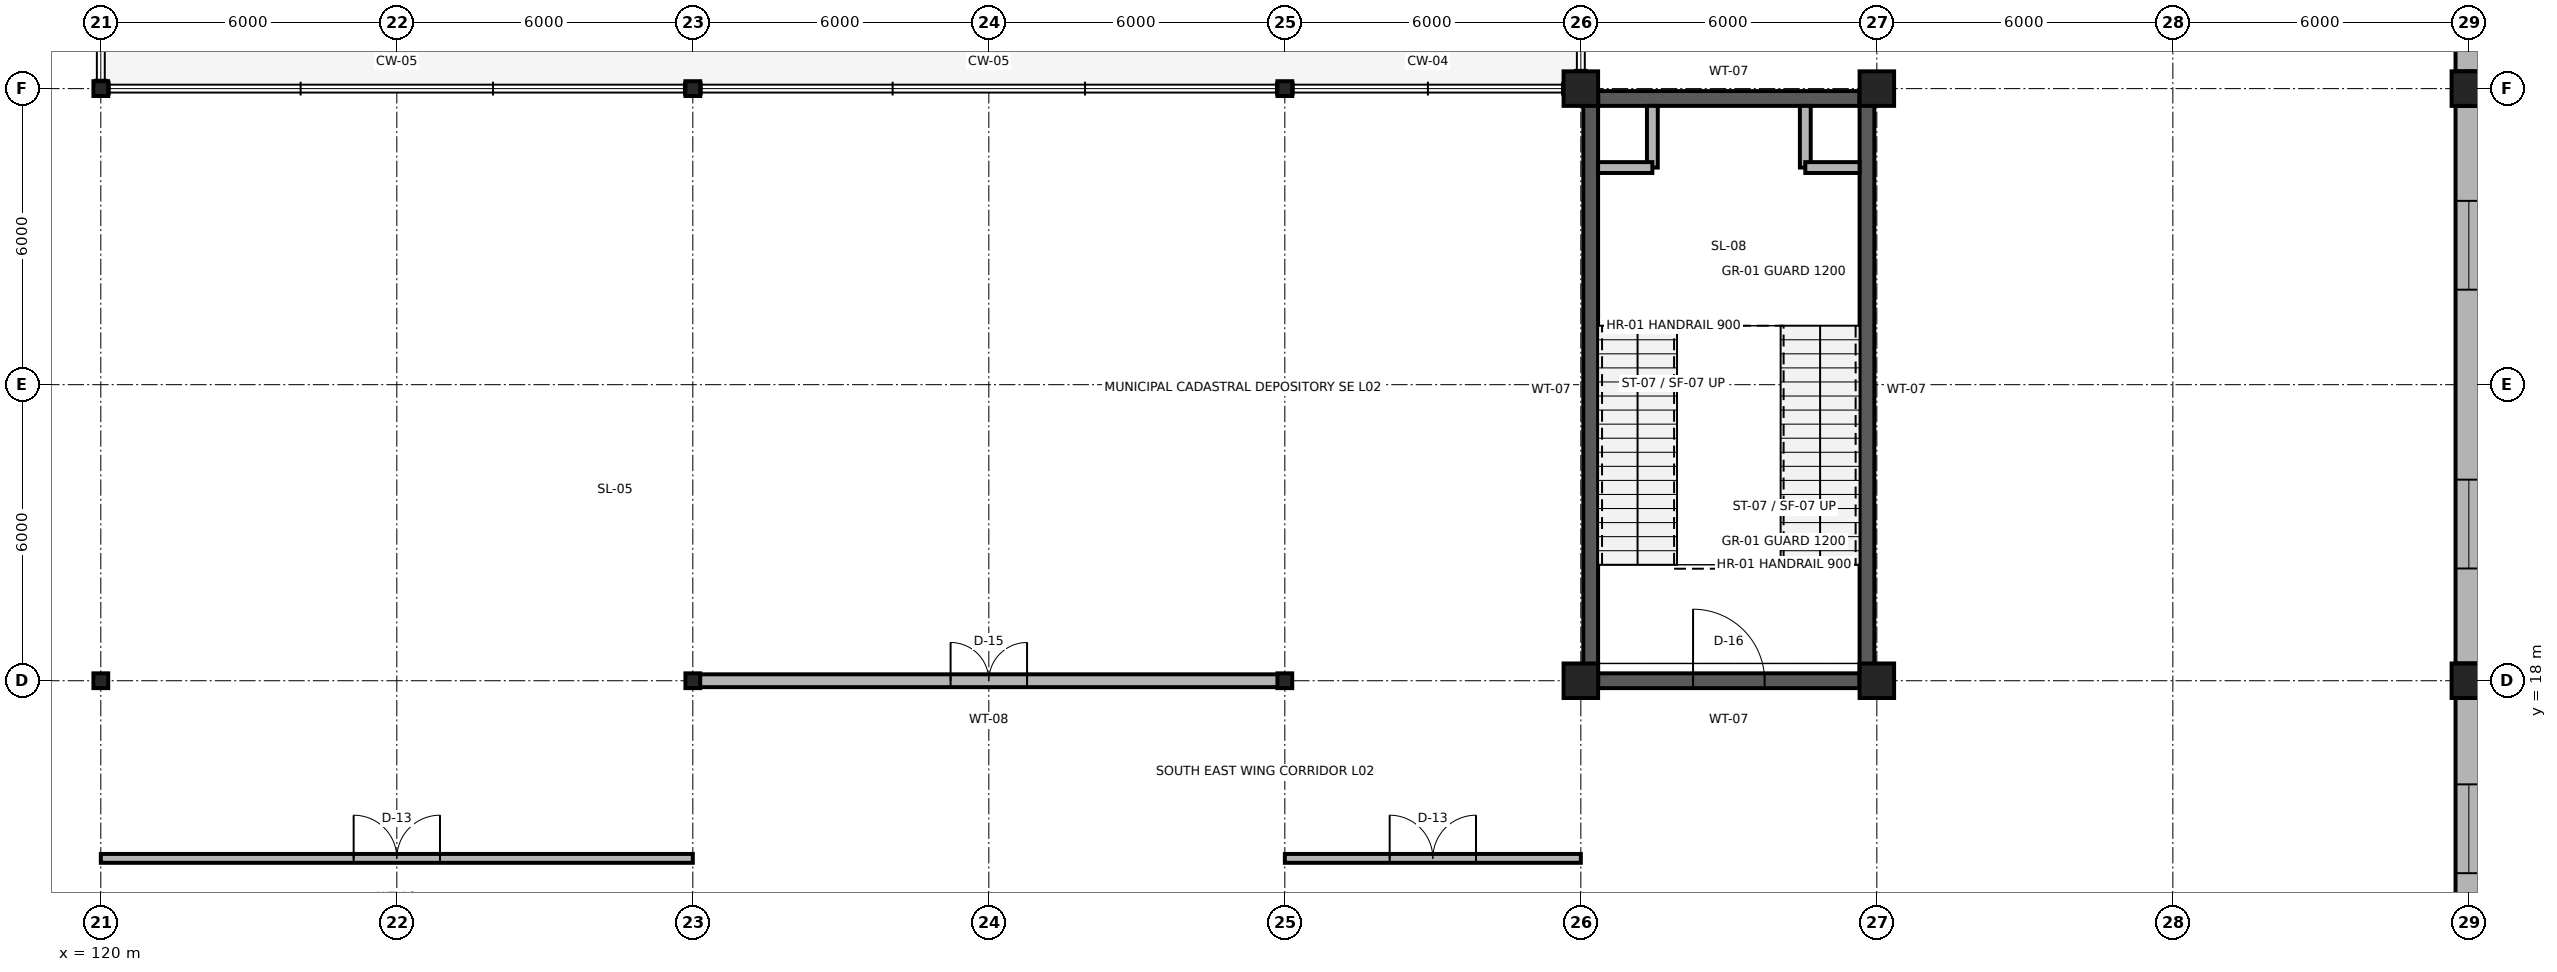
"""IFC4 building model, lengths in metres.
Left out: names, types, materials, properties, quantities, classifications, styles, units other than length and angle.
Written with IfcOpenShell. Run it as: python <this file> out.ifc"""

import sys

from ifc_helpers import new_model, si_unit, direction, frame, frame_2d, origin, origin_2d, place, context, subcontext, project, spatial, rectangle, i_section, extrude, element, fill, save


model = new_model("IFC4")
c1 = context("Model", 3, precision=1e-05, world=origin(), true_north=direction((0.0, 1.0)))
c2 = subcontext(c1, "Body", "Model", "MODEL_VIEW")
j1 = project(units=[si_unit("LENGTHUNIT", "METRE"), si_unit("PLANEANGLEUNIT", "RADIAN")], contexts=[c1])
p1 = place(None, origin())
s1 = spatial("IfcSite", under=j1, at=p1, CompositionType="ELEMENT")
p2 = place(p1, origin())
s2 = spatial("IfcBuilding", under=s1, at=p2, CompositionType="ELEMENT")
p3 = place(p2, frame((0.0, 0.0, 6.0)))
s3 = spatial("IfcBuildingStorey", under=s2, at=p3, CompositionType="ELEMENT", Elevation=6.0)
for number, where, z_axis, x_axis in (
    (1, (120.0, 18.0, 0.0), (0.0, 0.0, 1.0), (1.0, 0.0, 0.0)),
    (2, (132.0, 18.0, 0.0), (0.0, 0.0, 1.0), (1.0, 0.0, 0.0)),
    (3, (144.0, 18.0, 0.0), (0.0, 0.0, 1.0), (1.0, 0.0, 0.0)),
):
    element("IfcColumn", number, at=place(p3, frame(where, z_axis=z_axis, x_axis=x_axis)), inside=s3, PredefinedType="COLUMN", context=c2, shape_type="SweptSolid", body=[
        extrude(i_section(OverallWidth=0.3, OverallDepth=0.3, WebThickness=0.01, FlangeThickness=0.015, FilletRadius=0.018, at=origin_2d()), origin(), (0.0, 0.0, 1.0), 6.0),
    ])
for number, where, z_axis, x_axis in (
    (4, (150.0, 18.0, 0.0), (0.0, 0.0, 1.0), (1.0, 0.0, 0.0)),
    (5, (156.0, 18.0, 0.0), (0.0, 0.0, 1.0), (1.0, 0.0, 0.0)),
    (6, (168.0, 18.0, 0.0), (0.0, 0.0, 1.0), (1.0, 0.0, 0.0)),
):
    element("IfcColumn", number, at=place(p3, frame(where, z_axis=z_axis, x_axis=x_axis)), inside=s3, PredefinedType="COLUMN", context=c2, shape_type="SweptSolid", body=[
        extrude(rectangle(XDim=0.7, YDim=0.7, at=origin_2d()), origin(), (0.0, 0.0, 1.0), 6.0),
    ])
for number, where, z_axis, x_axis in (
    (7, (120.0, 30.0, 0.0), (0.0, 0.0, 1.0), (1.0, 0.0, 0.0)),
    (8, (132.0, 30.0, 0.0), (0.0, 0.0, 1.0), (1.0, 0.0, 0.0)),
    (9, (144.0, 30.0, 0.0), (0.0, 0.0, 1.0), (1.0, 0.0, 0.0)),
):
    element("IfcColumn", number, at=place(p3, frame(where, z_axis=z_axis, x_axis=x_axis)), inside=s3, PredefinedType="COLUMN", context=c2, shape_type="SweptSolid", body=[
        extrude(i_section(OverallWidth=0.3, OverallDepth=0.3, WebThickness=0.01, FlangeThickness=0.015, FilletRadius=0.018, at=origin_2d()), origin(), (0.0, 0.0, 1.0), 6.0),
    ])
for number, where, z_axis, x_axis in (
    (10, (150.0, 30.0, 0.0), (0.0, 0.0, 1.0), (1.0, 0.0, 0.0)),
    (11, (156.0, 30.0, 0.0), (0.0, 0.0, 1.0), (1.0, 0.0, 0.0)),
    (12, (168.0, 30.0, 0.0), (0.0, 0.0, 1.0), (1.0, 0.0, 0.0)),
):
    element("IfcColumn", number, at=place(p3, frame(where, z_axis=z_axis, x_axis=x_axis)), inside=s3, PredefinedType="COLUMN", context=c2, shape_type="SweptSolid", body=[
        extrude(rectangle(XDim=0.7, YDim=0.7, at=origin_2d()), origin(), (0.0, 0.0, 1.0), 6.0),
    ])
p4 = place(p3, frame((168.0, 12.35, 0.0), z_axis=(0.0, 0.0, 1.0), x_axis=(0.0, 1.0, 0.0)))
e13 = element("IfcWall", 13, at=p4, inside=s3, PredefinedType="SOLIDWALL", context=c2, shape_type="SweptSolid", body=[
    extrude(rectangle(XDim=5.3, YDim=0.54, at=frame_2d((2.65, 0.0))), origin(), (0.0, 0.0, 1.0), 5.31),
])
p5 = place(p4, frame((1.75, 0.0, 0.85)))
e14 = element("IfcOpeningElement", 14, at=p5, cuts=e13, PredefinedType="OPENING", context=c2, shape_type="SweptSolid", body=[
    extrude(rectangle(XDim=1.8, YDim=3.3, at=frame_2d((0.9, 1.65))), frame((0.0, 0.285, 0.0), z_axis=(0.0, -1.0, 0.0), x_axis=(1.0, 0.0, 0.0)), (0.0, 0.0, 1.0), 0.57),
])
p6 = place(p3, frame((168.0, 18.35, 0.0), z_axis=(0.0, 0.0, 1.0), x_axis=(0.0, 1.0, 0.0)))
e15 = element("IfcWall", 15, at=p6, inside=s3, PredefinedType="SOLIDWALL", context=c2, shape_type="SweptSolid", body=[
    extrude(rectangle(XDim=11.3, YDim=0.54, at=frame_2d((5.65, 0.0))), origin(), (0.0, 0.0, 1.0), 5.31),
])
p7 = place(p6, frame((1.925, 0.0, 0.85)))
e16 = element("IfcOpeningElement", 16, at=p7, cuts=e15, PredefinedType="OPENING", context=c2, shape_type="SweptSolid", body=[
    extrude(rectangle(XDim=1.8, YDim=3.3, at=frame_2d((0.9, 1.65))), frame((0.0, 0.285, 0.0), z_axis=(0.0, -1.0, 0.0), x_axis=(1.0, 0.0, 0.0)), (0.0, 0.0, 1.0), 0.57),
])
p8 = place(p6, frame((7.575, 0.0, 0.85)))
e17 = element("IfcOpeningElement", 17, at=p8, cuts=e15, PredefinedType="OPENING", context=c2, shape_type="SweptSolid", body=[
    extrude(rectangle(XDim=1.8, YDim=3.3, at=frame_2d((0.9, 1.65))), frame((0.0, 0.285, 0.0), z_axis=(0.0, -1.0, 0.0), x_axis=(1.0, 0.0, 0.0)), (0.0, 0.0, 1.0), 0.57),
])
p9 = place(p3, frame((168.0, 30.35, 0.0), z_axis=(0.0, 0.0, 1.0), x_axis=(0.0, 1.0, 0.0)))
e18 = element("IfcWall", 18, at=p9, inside=s3, PredefinedType="SOLIDWALL", context=c2, shape_type="SweptSolid", body=[
    extrude(rectangle(XDim=5.3, YDim=0.54, at=frame_2d((2.65, 0.0))), origin(), (0.0, 0.0, 1.0), 5.31),
])
p10 = place(p9, frame((1.75, 0.0, 0.85)))
e19 = element("IfcOpeningElement", 19, at=p10, cuts=e18, PredefinedType="OPENING", context=c2, shape_type="SweptSolid", body=[
    extrude(rectangle(XDim=1.8, YDim=3.3, at=frame_2d((0.9, 1.65))), frame((0.0, 0.285, 0.0), z_axis=(0.0, -1.0, 0.0), x_axis=(1.0, 0.0, 0.0)), (0.0, 0.0, 1.0), 0.57),
])
p11 = place(p3, frame((150.35, 18.0, 0.0), z_axis=(0.0, 0.0, 1.0), x_axis=(1.0, 0.0, 0.0)))
e20 = element("IfcWall", 20, at=p11, inside=s3, PredefinedType="SHEAR", context=c2, shape_type="SweptSolid", body=[
    extrude(rectangle(XDim=5.3, YDim=0.3, at=frame_2d((2.65, 0.0))), origin(), (0.0, 0.0, 1.0), 5.76),
])
p12 = place(p11, frame((1.925, 0.0, 0.0)))
e21 = element("IfcOpeningElement", 21, at=p12, cuts=e20, PredefinedType="OPENING", context=c2, shape_type="SweptSolid", body=[
    extrude(rectangle(XDim=1.45, YDim=2.25, at=frame_2d((0.725, 1.125))), frame((0.0, 0.165, 0.0), z_axis=(0.0, -1.0, 0.0), x_axis=(1.0, 0.0, 0.0)), (0.0, 0.0, 1.0), 0.33),
])
p13 = place(p3, frame((150.35, 29.8, 0.0), z_axis=(0.0, 0.0, 1.0), x_axis=(1.0, 0.0, 0.0)))
e22 = element("IfcWall", 22, at=p13, inside=s3, PredefinedType="SHEAR", context=c2, shape_type="SweptSolid", body=[
    extrude(rectangle(XDim=5.3, YDim=0.3, at=frame_2d((2.65, 0.0))), origin(), (0.0, 0.0, 1.0), 5.76),
])
for number, where, z_axis, x_axis in (
    (23, (150.2, 18.0, 0.0), (0.0, 0.0, 1.0), (0.0, 1.0, 0.0)),
    (24, (155.8, 18.0, 0.0), (0.0, 0.0, 1.0), (0.0, 1.0, 0.0)),
):
    element("IfcWall", number, at=place(p3, frame(where, z_axis=z_axis, x_axis=x_axis)), inside=s3, PredefinedType="SHEAR", context=c2, shape_type="SweptSolid", body=[
        extrude(rectangle(XDim=11.8, YDim=0.3, at=frame_2d((5.9, 0.0))), origin(), (0.0, 0.0, 1.0), 5.76),
    ])
p14 = place(p3, frame((151.45, 28.4, 0.0), z_axis=(0.0, 0.0, 1.0), x_axis=(0.0, 1.0, 0.0)))
e25 = element("IfcWall", 25, at=p14, inside=s3, PredefinedType="PARTITIONING", context=c2, shape_type="SweptSolid", body=[
    extrude(rectangle(XDim=1.25, YDim=0.22, at=frame_2d((0.625, 0.0))), origin(), (0.0, 0.0, 1.0), 5.76),
])
p15 = place(p3, frame((150.35, 28.4, 0.0), z_axis=(0.0, 0.0, 1.0), x_axis=(1.0, 0.0, 0.0)))
e26 = element("IfcWall", 26, at=p15, inside=s3, PredefinedType="PARTITIONING", context=c2, shape_type="SweptSolid", body=[
    extrude(rectangle(XDim=1.1, YDim=0.22, at=frame_2d((0.55, 0.0))), origin(), (0.0, 0.0, 1.0), 5.76),
])
p16 = place(p3, frame((154.55, 28.4, 0.0), z_axis=(0.0, 0.0, 1.0), x_axis=(0.0, 1.0, 0.0)))
e27 = element("IfcWall", 27, at=p16, inside=s3, PredefinedType="PARTITIONING", context=c2, shape_type="SweptSolid", body=[
    extrude(rectangle(XDim=1.25, YDim=0.22, at=frame_2d((0.625, 0.0))), origin(), (0.0, 0.0, 1.0), 5.76),
])
p17 = place(p3, frame((154.55, 28.4, 0.0), z_axis=(0.0, 0.0, 1.0), x_axis=(1.0, 0.0, 0.0)))
e28 = element("IfcWall", 28, at=p17, inside=s3, PredefinedType="PARTITIONING", context=c2, shape_type="SweptSolid", body=[
    extrude(rectangle(XDim=1.1, YDim=0.22, at=frame_2d((0.55, 0.0))), origin(), (0.0, 0.0, 1.0), 5.76),
])
p18 = place(p3, frame((120.0, 14.4, 0.0), z_axis=(0.0, 0.0, 1.0), x_axis=(1.0, 0.0, 0.0)))
e29 = element("IfcWall", 29, at=p18, inside=s3, PredefinedType="PARTITIONING", context=c2, shape_type="SweptSolid", body=[
    extrude(rectangle(XDim=12.0, YDim=0.18, at=frame_2d((6.0, 0.0))), origin(), (0.0, 0.0, 1.0), 5.76),
])
p19 = place(p18, frame((5.125, 0.0, 0.0)))
e30 = element("IfcOpeningElement", 30, at=p19, cuts=e29, PredefinedType="OPENING", context=c2, shape_type="SweptSolid", body=[
    extrude(rectangle(XDim=1.75, YDim=2.55, at=frame_2d((0.875, 1.275))), frame((0.0, 0.105, 0.0), z_axis=(0.0, -1.0, 0.0), x_axis=(1.0, 0.0, 0.0)), (0.0, 0.0, 1.0), 0.21),
])
p20 = place(p3, frame((144.0, 14.4, 0.0), z_axis=(0.0, 0.0, 1.0), x_axis=(1.0, 0.0, 0.0)))
e31 = element("IfcWall", 31, at=p20, inside=s3, PredefinedType="PARTITIONING", context=c2, shape_type="SweptSolid", body=[
    extrude(rectangle(XDim=6.0, YDim=0.18, at=frame_2d((3.0, 0.0))), origin(), (0.0, 0.0, 1.0), 5.76),
])
p21 = place(p20, frame((2.125, 0.0, 0.0)))
e32 = element("IfcOpeningElement", 32, at=p21, cuts=e31, PredefinedType="OPENING", context=c2, shape_type="SweptSolid", body=[
    extrude(rectangle(XDim=1.75, YDim=2.55, at=frame_2d((0.875, 1.275))), frame((0.0, 0.105, 0.0), z_axis=(0.0, -1.0, 0.0), x_axis=(1.0, 0.0, 0.0)), (0.0, 0.0, 1.0), 0.21),
])
p22 = place(p3, frame((132.0, 18.0, 0.0), z_axis=(0.0, 0.0, 1.0), x_axis=(1.0, 0.0, 0.0)))
e33 = element("IfcWall", 33, at=p22, inside=s3, PredefinedType="PARTITIONING", context=c2, shape_type="SweptSolid", body=[
    extrude(rectangle(XDim=12.0, YDim=0.26, at=frame_2d((6.0, 0.0))), origin(), (0.0, 0.0, 1.0), 5.178),
])
p23 = place(p22, frame((5.225, 0.0, 0.0)))
e34 = element("IfcOpeningElement", 34, at=p23, cuts=e33, PredefinedType="OPENING", context=c2, shape_type="SweptSolid", body=[
    extrude(rectangle(XDim=1.55, YDim=2.3, at=frame_2d((0.775, 1.15))), frame((0.0, 0.145, 0.0), z_axis=(0.0, -1.0, 0.0), x_axis=(1.0, 0.0, 0.0)), (0.0, 0.0, 1.0), 0.29),
])
p24 = place(p5, origin())
e35 = element("IfcWindow", 35, at=p24, inside=s3, PartitioningType="SINGLE_PANEL", PredefinedType="WINDOW", context=c2, shape_type="SweptSolid", body=[
    extrude(rectangle(XDim=1.8, YDim=3.3, at=frame_2d((0.9, 1.65))), frame((0.0, 0.03, 0.0), z_axis=(0.0, -1.0, 0.0), x_axis=(1.0, 0.0, 0.0)), (0.0, 0.0, 1.0), 0.06),
])
fill(e14, e35)
p25 = place(p7, origin())
e36 = element("IfcWindow", 36, at=p25, inside=s3, PartitioningType="SINGLE_PANEL", PredefinedType="WINDOW", context=c2, shape_type="SweptSolid", body=[
    extrude(rectangle(XDim=1.8, YDim=3.3, at=frame_2d((0.9, 1.65))), frame((0.0, 0.03, 0.0), z_axis=(0.0, -1.0, 0.0), x_axis=(1.0, 0.0, 0.0)), (0.0, 0.0, 1.0), 0.06),
])
fill(e16, e36)
p26 = place(p8, origin())
e37 = element("IfcWindow", 37, at=p26, inside=s3, PartitioningType="SINGLE_PANEL", PredefinedType="WINDOW", context=c2, shape_type="SweptSolid", body=[
    extrude(rectangle(XDim=1.8, YDim=3.3, at=frame_2d((0.9, 1.65))), frame((0.0, 0.03, 0.0), z_axis=(0.0, -1.0, 0.0), x_axis=(1.0, 0.0, 0.0)), (0.0, 0.0, 1.0), 0.06),
])
fill(e17, e37)
p27 = place(p12, origin())
e38 = element("IfcDoor", 38, at=p27, inside=s3, OperationType="SINGLE_SWING_LEFT", PredefinedType="DOOR", context=c2, shape_type="SweptSolid", body=[
    extrude(rectangle(XDim=1.45, YDim=2.25, at=frame_2d((0.725, 1.125))), frame((0.0, 0.025, 0.0), z_axis=(0.0, -1.0, 0.0), x_axis=(1.0, 0.0, 0.0)), (0.0, 0.0, 1.0), 0.05),
])
fill(e21, e38)
p28 = place(p19, origin())
e39 = element("IfcDoor", 39, at=p28, inside=s3, OperationType="DOUBLE_DOOR_SINGLE_SWING", PredefinedType="DOOR", context=c2, shape_type="SweptSolid", body=[
    extrude(rectangle(XDim=1.75, YDim=2.55, at=frame_2d((0.875, 1.275))), frame((0.0, 0.025, 0.0), z_axis=(0.0, -1.0, 0.0), x_axis=(1.0, 0.0, 0.0)), (0.0, 0.0, 1.0), 0.05),
])
fill(e30, e39)
p29 = place(p21, origin())
e40 = element("IfcDoor", 40, at=p29, inside=s3, OperationType="DOUBLE_DOOR_SINGLE_SWING", PredefinedType="DOOR", context=c2, shape_type="SweptSolid", body=[
    extrude(rectangle(XDim=1.75, YDim=2.55, at=frame_2d((0.875, 1.275))), frame((0.0, 0.025, 0.0), z_axis=(0.0, -1.0, 0.0), x_axis=(1.0, 0.0, 0.0)), (0.0, 0.0, 1.0), 0.05),
])
fill(e32, e40)
p30 = place(p23, origin())
e41 = element("IfcDoor", 41, at=p30, inside=s3, OperationType="DOUBLE_DOOR_SINGLE_SWING", PredefinedType="DOOR", context=c2, shape_type="SweptSolid", body=[
    extrude(rectangle(XDim=1.55, YDim=2.3, at=frame_2d((0.775, 1.15))), frame((0.0, 0.025, 0.0), z_axis=(0.0, -1.0, 0.0), x_axis=(1.0, 0.0, 0.0)), (0.0, 0.0, 1.0), 0.05),
])
fill(e34, e41)
save(model, sys.argv[1])
